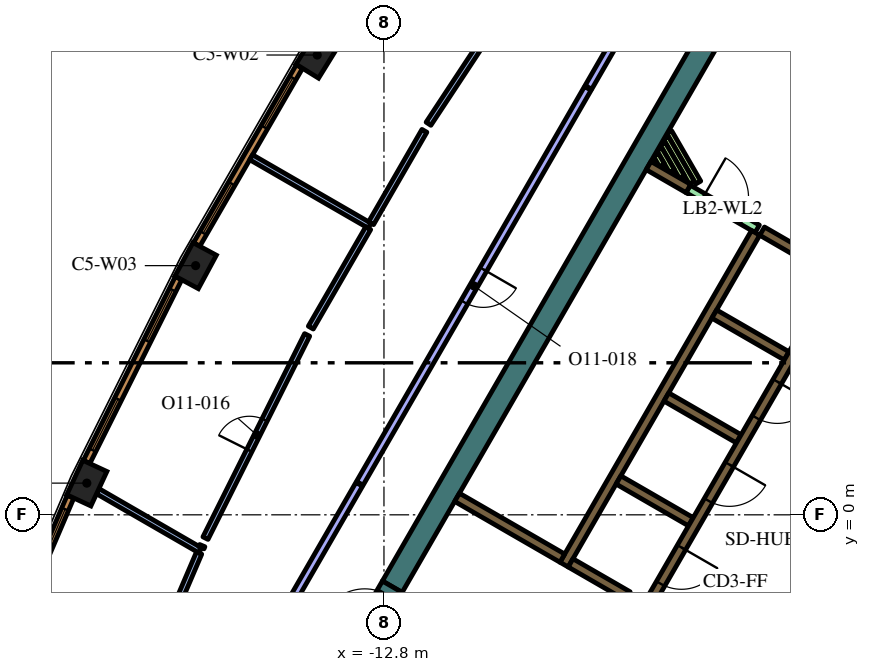
"""IFC4 building model, lengths in metres.
Left out: names, types, materials, properties, quantities, classifications, styles, units other than length and angle.
Written with IfcOpenShell. Run it as: python <this file> out.ifc"""

import sys

from ifc_helpers import new_model, si_unit, direction, frame, frame_2d, origin, origin_2d, place, context, subcontext, project, spatial, polyline, rectangle, outline, extrude, element, fill, save


model = new_model("IFC4")
c1 = context("Model", 3, precision=1e-05, world=origin(), true_north=direction((0.0, 1.0)))
c2 = subcontext(c1, "Body", "Model", "MODEL_VIEW")
j1 = project(units=[si_unit("LENGTHUNIT", "METRE"), si_unit("PLANEANGLEUNIT", "RADIAN")], contexts=[c1])
p1 = place(None, origin())
s1 = spatial("IfcSite", under=j1, at=p1, CompositionType="ELEMENT")
p2 = place(p1, origin())
s2 = spatial("IfcBuilding", under=s1, at=p2, CompositionType="ELEMENT")
p3 = place(p2, frame((0.0, 0.0, 275.4)))
s3 = spatial("IfcBuildingStorey", under=s2, at=p3, CompositionType="ELEMENT", Elevation=275.4)
for number, where, z_axis, x_axis in (
    (1, (-14.556, 12.098, 0.0), (0.0, 0.0, 1.0), (-0.526, -0.851, 0.0)),
    (2, (-17.756, 6.557, 0.0), (0.0, 0.0, 1.0), (-0.474, -0.881, 0.0)),
    (3, (-20.619, 0.834, 0.0), (0.0, 0.0, 1.0), (-0.421, -0.907, 0.0)),
):
    element("IfcColumn", number, at=place(p3, frame(where, z_axis=z_axis, x_axis=x_axis)), inside=s3, PredefinedType="COLUMN", context=c2, shape_type="SweptSolid", body=[
        extrude(rectangle(XDim=1.0, YDim=0.7, at=origin_2d()), origin(), (0.0, 0.0, 1.0), 4.2),
    ])
p4 = place(p3, frame((-4.234, 12.566, 0.0), z_axis=(0.0, 0.0, 1.0), x_axis=(-0.499998841866, -0.866026072432, 0.0)))
e4 = element("IfcWall", 4, at=p4, inside=s3, PredefinedType="SOLIDWALL", context=c2, shape_type="SweptSolid", body=[
    extrude(rectangle(XDim=16.694, YDim=0.6, at=frame_2d((8.347, 0.0))), origin(), (0.0, 0.0, 1.0), 4.2),
])
p5 = place(p3, frame((-3.02, 7.419, 0.0), z_axis=(0.0, 0.0, 1.0), x_axis=(-0.500022956343, -0.866012149528, 0.0)))
e5 = element("IfcWall", 5, at=p5, inside=s3, PredefinedType="SOLIDWALL", context=c2, shape_type="SweptSolid", body=[
    extrude(rectangle(XDim=10.08, YDim=0.25, at=frame_2d((5.04, 0.0))), origin(), (0.0, 0.0, 1.0), 4.2),
])
p6 = place(p3, origin())
e6 = element("IfcWall", 6, at=p6, inside=s3, PredefinedType="SOLIDWALL", context=c2, shape_type="SweptSolid", body=[
    extrude(outline(polyline([(-2.912, 7.356), (-2.787, 7.573), (-1.232, 6.675), (-1.303, 6.675), (-1.304, 6.675), (-1.304, 6.675), (-1.304, 6.525), (-1.304, 6.525), (-1.303, 6.525), (-0.971, 6.525), (-0.665, 6.348), (-0.79, 6.132), (-1.007, 6.257), (-1.007, 6.257), (-2.912, 7.356)])), origin(), (0.0, 0.0, 1.0), 4.2),
])
for number, where, z_axis, x_axis in (
    (7, (-2.204, 4.182, 0.0), (0.0, 0.0, 1.0), (-0.866, 0.5, 0.0)),
    (8, (-5.369, 3.1, 0.0), (0.0, 0.0, 1.0), (0.866, -0.5, 0.0)),
    (9, (-4.724, -0.182, 0.0), (0.0, 0.0, 1.0), (-0.866, 0.5, 0.0)),
):
    element("IfcWall", number, at=place(p3, frame(where, z_axis=z_axis, x_axis=x_axis)), inside=s3, PredefinedType="SOLIDWALL", context=c2, shape_type="SweptSolid", body=[
        extrude(rectangle(XDim=2.2, YDim=0.25, at=frame_2d((1.1, 0.0))), origin(), (0.0, 0.0, 1.0), 4.2),
    ])
p7 = place(p3, frame((-7.889, -1.265, 0.0), z_axis=(0.0, 0.0, 1.0), x_axis=(0.865986741702, -0.500066958712, 0.0)))
e10 = element("IfcWall", 10, at=p7, inside=s3, PredefinedType="SOLIDWALL", context=c2, shape_type="SweptSolid", body=[
    extrude(rectangle(XDim=1.738, YDim=0.25, at=frame_2d((0.869, 0.0))), origin(), (0.0, 0.0, 1.0), 4.2),
])
p8 = place(p3, frame((-8.106, -1.14, 0.0), z_axis=(0.0, 0.0, 1.0), x_axis=(-0.866008981251, 0.500028443584, 0.0)))
e11 = element("IfcWall", 11, at=p8, inside=s3, PredefinedType="SOLIDWALL", context=c2, shape_type="SweptSolid", body=[
    extrude(rectangle(XDim=3.2, YDim=0.25, at=frame_2d((1.6, 0.0))), origin(), (0.0, 0.0, 1.0), 4.2),
])
p9 = place(p3, frame((-5.837, 9.19, 0.0), z_axis=(0.0, 0.0, 1.0), x_axis=(0.866024298998, -0.500001913541, 0.0)))
e12 = element("IfcWall", 12, at=p9, inside=s3, PredefinedType="SOLIDWALL", context=c2, shape_type="SweptSolid", body=[
    extrude(rectangle(XDim=1.21, YDim=0.25, at=frame_2d((0.605, 0.0))), origin(), (0.0, 0.0, 1.0), 4.2),
])
p10 = place(p3, frame((-5.294, 10.067, 0.0), z_axis=(0.0, 0.0, 1.0), x_axis=(0.500054140411, -0.865994143547, 0.0)))
e13 = element("IfcWall", 13, at=p10, inside=s3, PredefinedType="PARTITIONING", context=c2, shape_type="SweptSolid", body=[
    extrude(rectangle(XDim=1.529, YDim=0.15, at=frame_2d((0.765, 0.0))), origin(), (0.0, 0.0, 1.0), 3.55),
])
p11 = place(p3, frame((-5.381, 9.917, 0.0), z_axis=(0.0, 0.0, 1.0), x_axis=(0.500136970483, -0.865946309396, 0.0)))
e14 = element("IfcWall", 14, at=p11, inside=s3, PredefinedType="PARTITIONING", context=c2, shape_type="SweptSolid", body=[
    extrude(rectangle(XDim=1.359, YDim=0.15, at=frame_2d((0.68, 0.0))), origin(), (0.0, 0.0, 1.0), 3.55),
])
p12 = place(p3, frame((-5.467, 9.767, 0.0), z_axis=(0.0, 0.0, 1.0), x_axis=(0.500168849293, -0.86592789665, 0.0)))
e15 = element("IfcWall", 15, at=p12, inside=s3, PredefinedType="PARTITIONING", context=c2, shape_type="SweptSolid", body=[
    extrude(rectangle(XDim=1.01, YDim=0.15, at=frame_2d((0.505, 0.0))), origin(), (0.0, 0.0, 1.0), 3.55),
])
p13 = place(p3, frame((-5.554, 9.617, 0.0), z_axis=(0.0, 0.0, 1.0), x_axis=(0.500253084543, -0.86587923604, 0.0)))
e16 = element("IfcWall", 16, at=p13, inside=s3, PredefinedType="PARTITIONING", context=c2, shape_type="SweptSolid", body=[
    extrude(rectangle(XDim=0.664, YDim=0.15, at=frame_2d((0.332, 0.0))), origin(), (0.0, 0.0, 1.0), 3.55),
])
p14 = place(p3, frame((-5.64, 9.467, 0.0), z_axis=(0.0, 0.0, 1.0), x_axis=(0.499944387978, -0.86605750902, 0.0)))
e17 = element("IfcWall", 17, at=p14, inside=s3, PredefinedType="PARTITIONING", context=c2, shape_type="SweptSolid", body=[
    extrude(rectangle(XDim=0.317, YDim=0.15, at=frame_2d((0.159, 0.0))), origin(), (0.0, 0.0, 1.0), 3.55),
])
p15 = place(p3, frame((-0.898, 6.194, 0.0), z_axis=(0.0, 0.0, 1.0), x_axis=(-0.499996202215, -0.866027596426, 0.0)))
e18 = element("IfcWall", 18, at=p15, inside=s3, PredefinedType="SOLIDWALL", context=c2, shape_type="SweptSolid", body=[
    extrude(rectangle(XDim=9.83, YDim=0.25, at=frame_2d((4.915, 0.0))), origin(), (0.0, 0.0, 1.0), 4.2),
])
p16 = place(p15, frame((0.585, 0.0, 0.0)))
e19 = element("IfcOpeningElement", 19, at=p16, cuts=e18, PredefinedType="OPENING", context=c2, shape_type="SweptSolid", body=[
    extrude(rectangle(XDim=1.1, YDim=2.1, at=frame_2d((0.55, 1.05))), frame((0.0, 0.135, 0.0), z_axis=(0.0, -1.0, 0.0), x_axis=(1.0, 0.0, 0.0)), (0.0, 0.0, 1.0), 0.27),
])
p17 = place(p15, frame((3.105, 0.0, 0.0)))
e20 = element("IfcOpeningElement", 20, at=p17, cuts=e18, PredefinedType="OPENING", context=c2, shape_type="SweptSolid", body=[
    extrude(rectangle(XDim=1.1, YDim=2.1, at=frame_2d((0.55, 1.05))), frame((0.0, 0.135, 0.0), z_axis=(0.0, -1.0, 0.0), x_axis=(1.0, 0.0, 0.0)), (0.0, 0.0, 1.0), 0.27),
])
p18 = place(p15, frame((5.625, 0.0, 0.0)))
e21 = element("IfcOpeningElement", 21, at=p18, cuts=e18, PredefinedType="OPENING", context=c2, shape_type="SweptSolid", body=[
    extrude(rectangle(XDim=1.1, YDim=2.1, at=frame_2d((0.55, 1.05))), frame((0.0, 0.135, 0.0), z_axis=(0.0, -1.0, 0.0), x_axis=(1.0, 0.0, 0.0)), (0.0, 0.0, 1.0), 0.27),
])
p19 = place(p15, frame((8.145, 0.0, 0.0)))
e22 = element("IfcOpeningElement", 22, at=p19, cuts=e18, PredefinedType="OPENING", context=c2, shape_type="SweptSolid", body=[
    extrude(rectangle(XDim=1.1, YDim=2.1, at=frame_2d((0.55, 1.05))), frame((0.0, 0.135, 0.0), z_axis=(0.0, -1.0, 0.0), x_axis=(1.0, 0.0, 0.0)), (0.0, 0.0, 1.0), 0.27),
])
p20 = place(p3, frame((-4.796, 8.575, 0.0), z_axis=(0.0, 0.0, 1.0), x_axis=(0.866009402589, -0.500027713859, 0.0)))
e23 = element("IfcWall", 23, at=p20, inside=s3, PredefinedType="PARTITIONING", context=c2, shape_type="SweptSolid", body=[
    extrude(rectangle(XDim=2.1, YDim=0.226, at=frame_2d((1.05, 0.0))), origin(), (0.0, 0.0, 1.0), 3.55),
])
p21 = place(p20, frame((0.45, 0.0, 0.0)))
e24 = element("IfcOpeningElement", 24, at=p21, cuts=e23, PredefinedType="OPENING", context=c2, shape_type="SweptSolid", body=[
    extrude(rectangle(XDim=1.2, YDim=2.1, at=frame_2d((0.6, 1.05))), frame((0.0, 0.123, 0.0), z_axis=(0.0, -1.0, 0.0), x_axis=(1.0, 0.0, 0.0)), (0.0, 0.0, 1.0), 0.246),
])
p22 = place(p3, frame((-13.432, -3.364, 0.0), z_axis=(0.0, 0.0, 1.0), x_axis=(0.500000056704, 0.866025371046, 0.0)))
e25 = element("IfcWall", 25, at=p22, inside=s3, PredefinedType="SOLIDWALL", context=c2, shape_type="SweptSolid", body=[
    extrude(rectangle(XDim=1.7, YDim=0.6, at=frame_2d((0.85, 0.0))), origin(), (0.0, 0.0, 1.0), 4.2),
])
p23 = place(p22, frame((0.25, 0.0, 0.0)))
e26 = element("IfcOpeningElement", 26, at=p23, cuts=e25, PredefinedType="OPENING", context=c2, shape_type="SweptSolid", body=[
    extrude(rectangle(XDim=1.2, YDim=2.1, at=frame_2d((0.6, 1.05))), frame((0.0, 0.31, 0.0), z_axis=(0.0, -1.0, 0.0), x_axis=(1.0, 0.0, 0.0)), (0.0, 0.0, 1.0), 0.62),
])
p24 = place(p3, frame((-13.177, 7.608, 0.0), z_axis=(0.0, 0.0, 1.0), x_axis=(-0.866018442252, 0.500012057535, 0.0)))
e27 = element("IfcWall", 27, at=p24, inside=s3, PredefinedType="PARTITIONING", context=c2, shape_type="SweptSolid", body=[
    extrude(rectangle(XDim=3.6, YDim=0.15, at=frame_2d((1.8, 0.0))), origin(), (0.0, 0.0, 1.0), 3.55),
])
p25 = place(p3, frame((-11.628, 10.29, 0.0), z_axis=(0.0, 0.0, 1.0), x_axis=(0.55074607557, 0.834672846236, 0.0)))
e28 = element("IfcWall", 28, at=p25, inside=s3, PredefinedType="PARTITIONING", context=c2, shape_type="SweptSolid", body=[
    extrude(rectangle(XDim=5.979, YDim=0.15, at=frame_2d((2.99, 0.0))), origin(), (0.0, 0.0, 1.0), 3.55),
])
p26 = place(p25, frame((2.58, 0.0, 0.0)))
e29 = element("IfcOpeningElement", 29, at=p26, cuts=e28, PredefinedType="OPENING", context=c2, shape_type="SweptSolid", body=[
    extrude(rectangle(XDim=0.9, YDim=2.1, at=frame_2d((0.45, 1.05))), frame((0.0, 0.085, 0.0), z_axis=(0.0, -1.0, 0.0), x_axis=(1.0, 0.0, 0.0)), (0.0, 0.0, 1.0), 0.17),
])
p27 = place(p3, frame((-11.736, 10.104, 0.0), z_axis=(0.0, 0.0, 1.0), x_axis=(-0.500011000363, -0.866019052629, 0.0)))
e30 = element("IfcWall", 30, at=p27, inside=s3, PredefinedType="PARTITIONING", context=c2, shape_type="SweptSolid", body=[
    extrude(rectangle(XDim=2.808, YDim=0.15, at=frame_2d((1.404, 0.0))), origin(), (0.0, 0.0, 1.0), 3.55),
])
p28 = place(p3, frame((-17.635, -0.936, 0.0), z_axis=(0.0, 0.0, 1.0), x_axis=(-0.866044607523, 0.499966736674, 0.0)))
e31 = element("IfcWall", 31, at=p28, inside=s3, PredefinedType="PARTITIONING", context=c2, shape_type="SweptSolid", body=[
    extrude(rectangle(XDim=3.115, YDim=0.15, at=frame_2d((1.557, 0.0))), origin(), (0.0, 0.0, 1.0), 3.55),
])
p29 = place(p3, frame((-13.214, 7.543, 0.0), z_axis=(0.0, 0.0, 1.0), x_axis=(-0.499927597274, -0.866067201483, 0.0)))
e32 = element("IfcWall", 32, at=p29, inside=s3, PredefinedType="PARTITIONING", context=c2, shape_type="SweptSolid", body=[
    extrude(rectangle(XDim=3.022, YDim=0.15, at=frame_2d((1.511, 0.0))), origin(), (0.0, 0.0, 1.0), 3.55),
])
p30 = place(p3, frame((-17.497, -0.613, 0.0), z_axis=(0.0, 0.0, 1.0), x_axis=(0.447474899467, 0.894296491297, 0.0)))
e33 = element("IfcWall", 33, at=p30, inside=s3, PredefinedType="PARTITIONING", context=c2, shape_type="SweptSolid", body=[
    extrude(rectangle(XDim=5.979, YDim=0.15, at=frame_2d((2.99, 0.0))), origin(), (0.0, 0.0, 1.0), 3.55),
])
p31 = place(p30, frame((2.58, 0.0, 0.0)))
e34 = element("IfcOpeningElement", 34, at=p31, cuts=e33, PredefinedType="OPENING", context=c2, shape_type="SweptSolid", body=[
    extrude(rectangle(XDim=0.9, YDim=2.1, at=frame_2d((0.45, 1.05))), frame((0.0, 0.085, 0.0), z_axis=(0.0, -1.0, 0.0), x_axis=(1.0, 0.0, 0.0)), (0.0, 0.0, 1.0), 0.17),
])
p32 = place(p3, frame((-17.581, -0.81, 0.0), z_axis=(0.0, 0.0, 1.0), x_axis=(-0.390033474923, -0.92080067791, 0.0)))
e35 = element("IfcWall", 35, at=p32, inside=s3, PredefinedType="PARTITIONING", context=c2, shape_type="SweptSolid", body=[
    extrude(rectangle(XDim=0.061, YDim=0.15, at=frame_2d((0.03, 0.0))), origin(), (0.0, 0.0, 1.0), 3.55),
])
p33 = place(p3, frame((-19.8, -5.998, 0.0), z_axis=(0.0, 0.0, 1.0), x_axis=(0.39332238233, 0.919400621904, 0.0)))
e36 = element("IfcWall", 36, at=p33, inside=s3, PredefinedType="PARTITIONING", context=c2, shape_type="SweptSolid", body=[
    extrude(rectangle(XDim=5.431, YDim=0.15, at=frame_2d((2.715, 0.0))), origin(), (0.0, 0.0, 1.0), 3.55),
])
p34 = place(p33, frame((2.231, 0.0, 0.0)))
e37 = element("IfcOpeningElement", 37, at=p34, cuts=e36, PredefinedType="OPENING", context=c2, shape_type="SweptSolid", body=[
    extrude(rectangle(XDim=0.9, YDim=2.1, at=frame_2d((0.45, 1.05))), frame((0.0, 0.085, 0.0), z_axis=(0.0, -1.0, 0.0), x_axis=(1.0, 0.0, 0.0)), (0.0, 0.0, 1.0), 0.17),
])
p35 = place(p3, frame((-7.436, 11.221, 0.0), z_axis=(0.0, 0.0, 1.0), x_axis=(-0.49999894854, -0.866026010844, 0.0)))
e38 = element("IfcWall", 38, at=p35, inside=s3, PredefinedType="PARTITIONING", context=c2, shape_type="SweptSolid", body=[
    extrude(rectangle(XDim=12.0, YDim=0.2, at=frame_2d((6.0, 0.0))), origin(), (0.0, 0.0, 1.0), 3.55),
])
p36 = place(p35, frame((5.5, 0.0, 0.0)))
e39 = element("IfcOpeningElement", 39, at=p36, cuts=e38, PredefinedType="OPENING", context=c2, shape_type="SweptSolid", body=[
    extrude(rectangle(XDim=1.0, YDim=2.1, at=frame_2d((0.5, 1.05))), frame((0.0, 0.11, 0.0), z_axis=(0.0, -1.0, 0.0), x_axis=(1.0, 0.0, 0.0)), (0.0, 0.0, 1.0), 0.22),
])
p37 = place(p3, frame((-13.451, 0.803, 0.0), z_axis=(0.0, 0.0, 1.0), x_axis=(-0.499982585408, -0.86603545787, 0.0)))
e40 = element("IfcWall", 40, at=p37, inside=s3, PredefinedType="PARTITIONING", context=c2, shape_type="SweptSolid", body=[
    extrude(rectangle(XDim=8.26, YDim=0.2, at=frame_2d((4.13, 0.0))), origin(), (0.0, 0.0, 1.0), 3.55),
])
p38 = place(p3, frame((-3.306, 18.374, 0.0), z_axis=(0.0, 0.0, 1.0), x_axis=(-0.499999798456, -0.866025520146, 0.0)))
e41 = element("IfcWall", 41, at=p38, inside=s3, PredefinedType="PARTITIONING", context=c2, shape_type="SweptSolid", body=[
    extrude(rectangle(XDim=8.229, YDim=0.2, at=frame_2d((4.115, 0.0))), origin(), (0.0, 0.0, 1.0), 3.55),
])
p39 = place(p3, frame((-15.025, 11.796, 0.0), z_axis=(0.0, 0.0, 1.0), x_axis=(-0.500024767483, -0.866011103799, 0.0)))
e42 = element("IfcWall", 42, at=p39, inside=s3, PredefinedType="SOLIDWALL", context=c2, shape_type="SweptSolid", body=[
    extrude(rectangle(XDim=5.406, YDim=0.19, at=frame_2d((2.703, 0.0))), origin(), (0.0, 0.0, 1.0), 3.95),
])
p40 = place(p39, frame((0.346, 0.0, 0.6)))
e43 = element("IfcOpeningElement", 43, at=p40, cuts=e42, PredefinedType="OPENING", context=c2, shape_type="SweptSolid", body=[
    extrude(rectangle(XDim=1.5, YDim=2.85, at=frame_2d((0.75, 1.425))), frame((0.0, 0.105, 0.0), z_axis=(0.0, -1.0, 0.0), x_axis=(1.0, 0.0, 0.0)), (0.0, 0.0, 1.0), 0.21),
])
p41 = place(p39, frame((3.559, 0.0, 0.6)))
e44 = element("IfcOpeningElement", 44, at=p41, cuts=e42, PredefinedType="OPENING", context=c2, shape_type="SweptSolid", body=[
    extrude(rectangle(XDim=1.5, YDim=2.85, at=frame_2d((0.75, 1.425))), frame((0.0, 0.105, 0.0), z_axis=(0.0, -1.0, 0.0), x_axis=(1.0, 0.0, 0.0)), (0.0, 0.0, 1.0), 0.21),
])
p42 = place(p3, frame((-18.206, 6.227, 0.0), z_axis=(0.0, 0.0, 1.0), x_axis=(-0.447484531401, -0.894291671747, 0.0)))
e45 = element("IfcWall", 45, at=p42, inside=s3, PredefinedType="SOLIDWALL", context=c2, shape_type="SweptSolid", body=[
    extrude(rectangle(XDim=5.406, YDim=0.19, at=frame_2d((2.703, 0.0))), origin(), (0.0, 0.0, 1.0), 3.95),
])
p43 = place(p42, frame((0.346, 0.0, 0.6)))
e46 = element("IfcOpeningElement", 46, at=p43, cuts=e45, PredefinedType="OPENING", context=c2, shape_type="SweptSolid", body=[
    extrude(rectangle(XDim=1.5, YDim=2.85, at=frame_2d((0.75, 1.425))), frame((0.0, 0.105, 0.0), z_axis=(0.0, -1.0, 0.0), x_axis=(1.0, 0.0, 0.0)), (0.0, 0.0, 1.0), 0.21),
])
p44 = place(p42, frame((3.559, 0.0, 0.6)))
e47 = element("IfcOpeningElement", 47, at=p44, cuts=e45, PredefinedType="OPENING", context=c2, shape_type="SweptSolid", body=[
    extrude(rectangle(XDim=1.5, YDim=2.85, at=frame_2d((0.75, 1.425))), frame((0.0, 0.105, 0.0), z_axis=(0.0, -1.0, 0.0), x_axis=(1.0, 0.0, 0.0)), (0.0, 0.0, 1.0), 0.21),
])
p45 = place(p3, frame((-21.049, 0.478, 0.0), z_axis=(0.0, 0.0, 1.0), x_axis=(-0.393347848476, -0.919389726992, 0.0)))
e48 = element("IfcWall", 48, at=p45, inside=s3, PredefinedType="SOLIDWALL", context=c2, shape_type="SweptSolid", body=[
    extrude(rectangle(XDim=5.415, YDim=0.19, at=frame_2d((2.708, 0.0))), origin(), (0.0, 0.0, 1.0), 3.95),
])
p46 = place(p45, frame((0.357, 0.0, 0.6)))
e49 = element("IfcOpeningElement", 49, at=p46, cuts=e48, PredefinedType="OPENING", context=c2, shape_type="SweptSolid", body=[
    extrude(rectangle(XDim=1.5, YDim=2.85, at=frame_2d((0.75, 1.425))), frame((0.0, 0.105, 0.0), z_axis=(0.0, -1.0, 0.0), x_axis=(1.0, 0.0, 0.0)), (0.0, 0.0, 1.0), 0.21),
])
p47 = place(p45, frame((3.593, 0.0, 0.6)))
e50 = element("IfcOpeningElement", 50, at=p47, cuts=e48, PredefinedType="OPENING", context=c2, shape_type="SweptSolid", body=[
    extrude(rectangle(XDim=1.5, YDim=2.85, at=frame_2d((0.75, 1.425))), frame((0.0, 0.105, 0.0), z_axis=(0.0, -1.0, 0.0), x_axis=(1.0, 0.0, 0.0)), (0.0, 0.0, 1.0), 0.21),
])
p48 = place(p17, origin())
e51 = element("IfcDoor", 51, at=p48, inside=s3, OperationType="DOUBLE_DOOR_SLIDING", PredefinedType="DOOR", context=c2, shape_type="SweptSolid", body=[
    extrude(rectangle(XDim=1.1, YDim=2.1, at=frame_2d((0.55, 1.05))), frame((0.0, 0.025, 0.0), z_axis=(0.0, -1.0, 0.0), x_axis=(1.0, 0.0, 0.0)), (0.0, 0.0, 1.0), 0.05),
])
fill(e20, e51)
p49 = place(p18, origin())
e52 = element("IfcDoor", 52, at=p49, inside=s3, OperationType="DOUBLE_DOOR_SLIDING", PredefinedType="DOOR", context=c2, shape_type="SweptSolid", body=[
    extrude(rectangle(XDim=1.1, YDim=2.1, at=frame_2d((0.55, 1.05))), frame((0.0, 0.025, 0.0), z_axis=(0.0, -1.0, 0.0), x_axis=(1.0, 0.0, 0.0)), (0.0, 0.0, 1.0), 0.05),
])
fill(e21, e52)
p50 = place(p19, origin())
e53 = element("IfcDoor", 53, at=p50, inside=s3, OperationType="DOUBLE_DOOR_SLIDING", PredefinedType="DOOR", context=c2, shape_type="SweptSolid", body=[
    extrude(rectangle(XDim=1.1, YDim=2.1, at=frame_2d((0.55, 1.05))), frame((0.0, 0.025, 0.0), z_axis=(0.0, -1.0, 0.0), x_axis=(1.0, 0.0, 0.0)), (0.0, 0.0, 1.0), 0.05),
])
fill(e22, e53)
p51 = place(p21, origin())
e54 = element("IfcDoor", 54, at=p51, inside=s3, OperationType="SINGLE_SWING_LEFT", PredefinedType="DOOR", context=c2, shape_type="SweptSolid", body=[
    extrude(rectangle(XDim=1.2, YDim=2.1, at=frame_2d((0.6, 1.05))), frame((0.0, 0.025, 0.0), z_axis=(0.0, -1.0, 0.0), x_axis=(1.0, 0.0, 0.0)), (0.0, 0.0, 1.0), 0.05),
])
fill(e24, e54)
p52 = place(p31, origin())
e55 = element("IfcDoor", 55, at=p52, inside=s3, OperationType="SINGLE_SWING_RIGHT", PredefinedType="DOOR", context=c2, shape_type="SweptSolid", body=[
    extrude(rectangle(XDim=0.9, YDim=2.1, at=frame_2d((0.45, 1.05))), frame((0.0, 0.025, 0.0), z_axis=(0.0, -1.0, 0.0), x_axis=(1.0, 0.0, 0.0)), (0.0, 0.0, 1.0), 0.05),
])
fill(e34, e55)
p53 = place(p36, origin())
e56 = element("IfcDoor", 56, at=p53, inside=s3, OperationType="SINGLE_SWING_RIGHT", PredefinedType="DOOR", context=c2, shape_type="SweptSolid", body=[
    extrude(rectangle(XDim=1.0, YDim=2.1, at=frame_2d((0.5, 1.05))), frame((0.0, 0.025, 0.0), z_axis=(0.0, -1.0, 0.0), x_axis=(1.0, 0.0, 0.0)), (0.0, 0.0, 1.0), 0.05),
])
fill(e39, e56)
p54 = place(p40, origin())
e57 = element("IfcWindow", 57, at=p54, inside=s3, PartitioningType="SINGLE_PANEL", PredefinedType="WINDOW", context=c2, shape_type="SweptSolid", body=[
    extrude(rectangle(XDim=1.5, YDim=2.85, at=frame_2d((0.75, 1.425))), frame((0.0, 0.045, 0.0), z_axis=(0.0, -1.0, 0.0), x_axis=(1.0, 0.0, 0.0)), (0.0, 0.0, 1.0), 0.06),
])
fill(e43, e57)
p55 = place(p41, origin())
e58 = element("IfcWindow", 58, at=p55, inside=s3, PartitioningType="SINGLE_PANEL", PredefinedType="WINDOW", context=c2, shape_type="SweptSolid", body=[
    extrude(rectangle(XDim=1.5, YDim=2.85, at=frame_2d((0.75, 1.425))), frame((0.0, 0.045, 0.0), z_axis=(0.0, -1.0, 0.0), x_axis=(1.0, 0.0, 0.0)), (0.0, 0.0, 1.0), 0.06),
])
fill(e44, e58)
p56 = place(p43, origin())
e59 = element("IfcWindow", 59, at=p56, inside=s3, PartitioningType="SINGLE_PANEL", PredefinedType="WINDOW", context=c2, shape_type="SweptSolid", body=[
    extrude(rectangle(XDim=1.5, YDim=2.85, at=frame_2d((0.75, 1.425))), frame((0.0, 0.045, 0.0), z_axis=(0.0, -1.0, 0.0), x_axis=(1.0, 0.0, 0.0)), (0.0, 0.0, 1.0), 0.06),
])
fill(e46, e59)
p57 = place(p44, origin())
e60 = element("IfcWindow", 60, at=p57, inside=s3, PartitioningType="SINGLE_PANEL", PredefinedType="WINDOW", context=c2, shape_type="SweptSolid", body=[
    extrude(rectangle(XDim=1.5, YDim=2.85, at=frame_2d((0.75, 1.425))), frame((0.0, 0.045, 0.0), z_axis=(0.0, -1.0, 0.0), x_axis=(1.0, 0.0, 0.0)), (0.0, 0.0, 1.0), 0.06),
])
fill(e47, e60)
p58 = place(p46, origin())
e61 = element("IfcWindow", 61, at=p58, inside=s3, PartitioningType="SINGLE_PANEL", PredefinedType="WINDOW", context=c2, shape_type="SweptSolid", body=[
    extrude(rectangle(XDim=1.5, YDim=2.85, at=frame_2d((0.75, 1.425))), frame((0.0, 0.045, 0.0), z_axis=(0.0, -1.0, 0.0), x_axis=(1.0, 0.0, 0.0)), (0.0, 0.0, 1.0), 0.06),
])
fill(e49, e61)
save(model, sys.argv[1])
